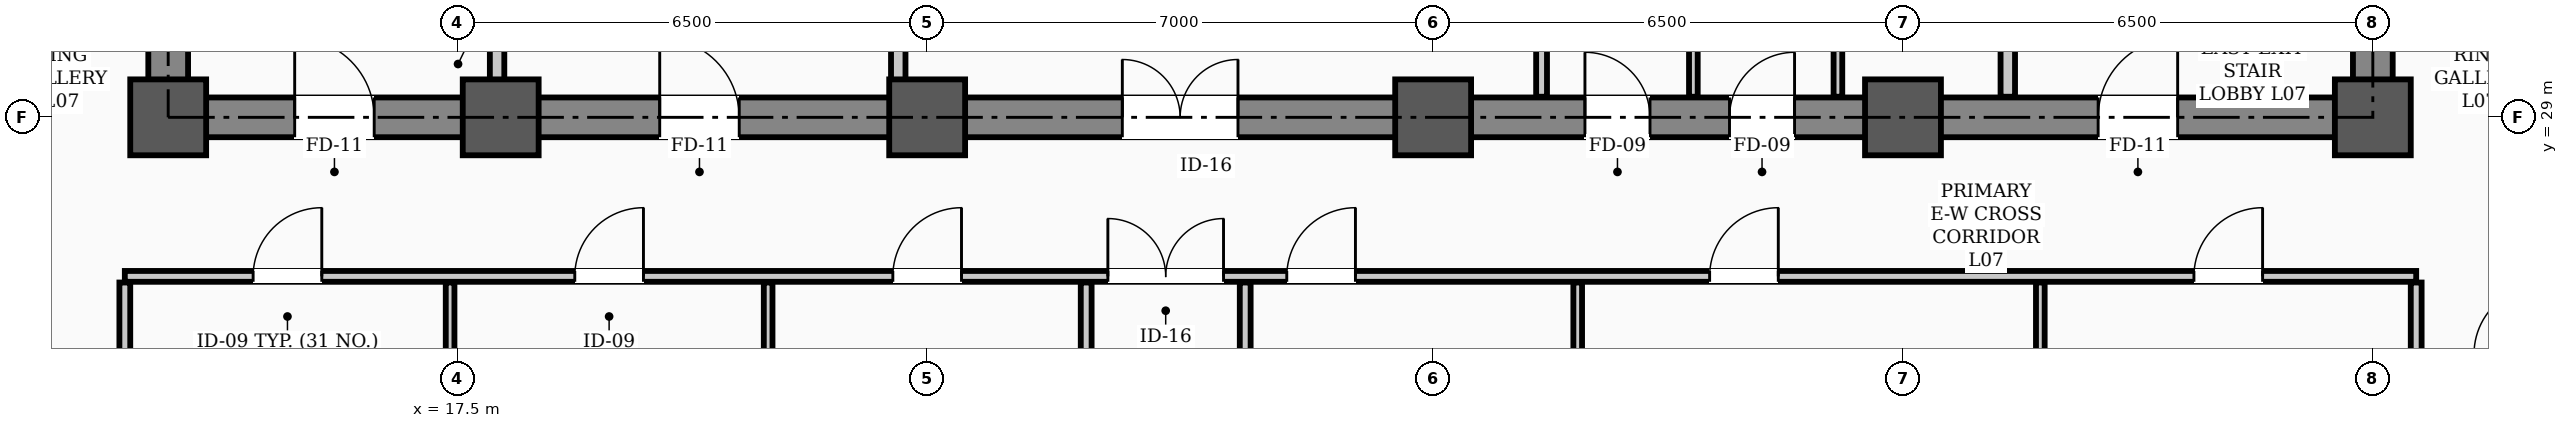
"""IFC4 building model, lengths in metres.
Left out: names, types, materials, properties, quantities, classifications, styles, units other than length and angle.
Written with IfcOpenShell. Run it as: python <this file> out.ifc"""

import sys

from ifc_helpers import new_model, si_unit, direction, frame, frame_2d, origin, origin_2d, place, context, subcontext, project, spatial, rectangle, hollow_rectangle, extrude, element, fill, save


model = new_model("IFC4")
c1 = context("Model", 3, precision=1e-05, world=origin(), true_north=direction((0.0, 1.0)))
c2 = subcontext(c1, "Body", "Model", "MODEL_VIEW")
j1 = project(units=[si_unit("LENGTHUNIT", "METRE"), si_unit("PLANEANGLEUNIT", "RADIAN")], contexts=[c1])
p1 = place(None, origin())
s1 = spatial("IfcSite", under=j1, at=p1, CompositionType="ELEMENT")
p2 = place(p1, origin())
s2 = spatial("IfcBuilding", under=s1, at=p2, CompositionType="ELEMENT")
p3 = place(p2, frame((0.0, 0.0, 30.4)))
s3 = spatial("IfcBuildingStorey", under=s2, at=p3, CompositionType="ELEMENT", Elevation=30.4)
for number, where, z_axis, x_axis in (
    (1, (13.5, 29.0, 0.0), (0.0, 0.0, 1.0), (1.0, 0.0, 0.0)),
    (2, (18.1, 29.0, 0.0), (0.0, 0.0, 1.0), (1.0, 0.0, 0.0)),
    (3, (24.0, 29.0, 0.0), (0.0, 0.0, 1.0), (1.0, 0.0, 0.0)),
    (4, (31.0, 29.0, 0.0), (0.0, 0.0, 1.0), (1.0, 0.0, 0.0)),
    (5, (37.5, 29.0, 0.0), (0.0, 0.0, 1.0), (1.0, 0.0, 0.0)),
    (6, (44.0, 29.0, 0.0), (0.0, 0.0, 1.0), (1.0, 0.0, 0.0)),
):
    element("IfcColumn", number, at=place(p3, frame(where, z_axis=z_axis, x_axis=x_axis)), inside=s3, PredefinedType="COLUMN", context=c2, shape_type="SweptSolid", body=[
        extrude(hollow_rectangle(XDim=1.05, YDim=1.05, WallThickness=0.038, InnerFilletRadius=0.019, OuterFilletRadius=0.057, at=origin_2d()), origin(), (0.0, 0.0, 1.0), 3.9),
    ])
p4 = place(p3, frame((13.5, 29.0, 0.0), z_axis=(0.0, 0.0, 1.0), x_axis=(1.0, 0.0, 0.0)))
e7 = element("IfcWall", 7, at=p4, inside=s3, PredefinedType="SHEAR", context=c2, shape_type="SweptSolid", body=[
    extrude(rectangle(XDim=30.5, YDim=0.55, at=frame_2d((15.25, 0.0))), origin(), (0.0, 0.0, 1.0), 3.72),
])
p5 = place(p4, frame((1.75, 0.0, 0.0)))
e8 = element("IfcOpeningElement", 8, at=p5, cuts=e7, PredefinedType="OPENING", context=c2, shape_type="SweptSolid", body=[
    extrude(rectangle(XDim=1.1, YDim=2.08, at=frame_2d((0.55, 1.04))), frame((0.0, 0.285, 0.0), z_axis=(0.0, -1.0, 0.0), x_axis=(1.0, 0.0, 0.0)), (0.0, 0.0, 1.0), 0.57),
])
p6 = place(p4, frame((26.7, 0.0, 0.0)))
e9 = element("IfcOpeningElement", 9, at=p6, cuts=e7, PredefinedType="OPENING", context=c2, shape_type="SweptSolid", body=[
    extrude(rectangle(XDim=1.1, YDim=2.08, at=frame_2d((0.55, 1.04))), frame((0.0, 0.285, 0.0), z_axis=(0.0, -1.0, 0.0), x_axis=(1.0, 0.0, 0.0)), (0.0, 0.0, 1.0), 0.57),
])
p7 = place(p4, frame((6.8, 0.0, 0.0)))
e10 = element("IfcOpeningElement", 10, at=p7, cuts=e7, PredefinedType="OPENING", context=c2, shape_type="SweptSolid", body=[
    extrude(rectangle(XDim=1.1, YDim=2.08, at=frame_2d((0.55, 1.04))), frame((0.0, 0.285, 0.0), z_axis=(0.0, -1.0, 0.0), x_axis=(1.0, 0.0, 0.0)), (0.0, 0.0, 1.0), 0.57),
])
p8 = place(p4, frame((13.2, 0.0, 0.0)))
e11 = element("IfcOpeningElement", 11, at=p8, cuts=e7, PredefinedType="OPENING", context=c2, shape_type="SweptSolid", body=[
    extrude(rectangle(XDim=1.6, YDim=2.08, at=frame_2d((0.8, 1.04))), frame((0.0, 0.285, 0.0), z_axis=(0.0, -1.0, 0.0), x_axis=(1.0, 0.0, 0.0)), (0.0, 0.0, 1.0), 0.57),
])
p9 = place(p4, frame((19.6, 0.0, 0.0)))
e12 = element("IfcOpeningElement", 12, at=p9, cuts=e7, PredefinedType="OPENING", context=c2, shape_type="SweptSolid", body=[
    extrude(rectangle(XDim=0.9, YDim=2.08, at=frame_2d((0.45, 1.04))), frame((0.0, 0.285, 0.0), z_axis=(0.0, -1.0, 0.0), x_axis=(1.0, 0.0, 0.0)), (0.0, 0.0, 1.0), 0.57),
])
p10 = place(p4, frame((21.6, 0.0, 0.0)))
e13 = element("IfcOpeningElement", 13, at=p10, cuts=e7, PredefinedType="OPENING", context=c2, shape_type="SweptSolid", body=[
    extrude(rectangle(XDim=0.9, YDim=2.08, at=frame_2d((0.45, 1.04))), frame((0.0, 0.285, 0.0), z_axis=(0.0, -1.0, 0.0), x_axis=(1.0, 0.0, 0.0)), (0.0, 0.0, 1.0), 0.57),
])
for number, where, z_axis, x_axis in (
    (14, (13.5, 29.35, 0.0), (0.0, 0.0, 1.0), (0.0, 1.0, 0.0)),
    (15, (44.0, 29.35, 0.0), (0.0, 0.0, 1.0), (0.0, 1.0, 0.0)),
):
    element("IfcWall", number, at=place(p3, frame(where, z_axis=z_axis, x_axis=x_axis)), inside=s3, PredefinedType="SHEAR", context=c2, shape_type="SweptSolid", body=[
        extrude(rectangle(XDim=8.6, YDim=0.55, at=frame_2d((4.3, 0.0))), origin(), (0.0, 0.0, 1.0), 3.72),
    ])
p11 = place(p3, frame((12.9, 26.8, 0.0), z_axis=(0.0, 0.0, 1.0), x_axis=(1.0, 0.0, 0.0)))
e16 = element("IfcWall", 16, at=p11, inside=s3, PredefinedType="PARTITIONING", context=c2, shape_type="SweptSolid", body=[
    extrude(rectangle(XDim=31.7, YDim=0.15, at=frame_2d((15.85, 0.0))), origin(), (0.0, 0.0, 1.0), 3.1),
])
p12 = place(p11, frame((13.6, 0.0, 0.0)))
e17 = element("IfcOpeningElement", 17, at=p12, cuts=e16, PredefinedType="OPENING", context=c2, shape_type="SweptSolid", body=[
    extrude(rectangle(XDim=1.6, YDim=2.08, at=frame_2d((0.8, 1.04))), frame((0.0, 0.085, 0.0), z_axis=(0.0, -1.0, 0.0), x_axis=(1.0, 0.0, 0.0)), (0.0, 0.0, 1.0), 0.17),
])
p13 = place(p11, frame((1.775, 0.0, 0.0)))
e18 = element("IfcOpeningElement", 18, at=p13, cuts=e16, PredefinedType="OPENING", context=c2, shape_type="SweptSolid", body=[
    extrude(rectangle(XDim=0.95, YDim=2.08, at=frame_2d((0.475, 1.04))), frame((0.0, 0.085, 0.0), z_axis=(0.0, -1.0, 0.0), x_axis=(1.0, 0.0, 0.0)), (0.0, 0.0, 1.0), 0.17),
])
p14 = place(p11, frame((6.225, 0.0, 0.0)))
e19 = element("IfcOpeningElement", 19, at=p14, cuts=e16, PredefinedType="OPENING", context=c2, shape_type="SweptSolid", body=[
    extrude(rectangle(XDim=0.95, YDim=2.08, at=frame_2d((0.475, 1.04))), frame((0.0, 0.085, 0.0), z_axis=(0.0, -1.0, 0.0), x_axis=(1.0, 0.0, 0.0)), (0.0, 0.0, 1.0), 0.17),
])
p15 = place(p11, frame((10.625, 0.0, 0.0)))
e20 = element("IfcOpeningElement", 20, at=p15, cuts=e16, PredefinedType="OPENING", context=c2, shape_type="SweptSolid", body=[
    extrude(rectangle(XDim=0.95, YDim=2.08, at=frame_2d((0.475, 1.04))), frame((0.0, 0.085, 0.0), z_axis=(0.0, -1.0, 0.0), x_axis=(1.0, 0.0, 0.0)), (0.0, 0.0, 1.0), 0.17),
])
p16 = place(p11, frame((16.075, 0.0, 0.0)))
e21 = element("IfcOpeningElement", 21, at=p16, cuts=e16, PredefinedType="OPENING", context=c2, shape_type="SweptSolid", body=[
    extrude(rectangle(XDim=0.95, YDim=2.08, at=frame_2d((0.475, 1.04))), frame((0.0, 0.085, 0.0), z_axis=(0.0, -1.0, 0.0), x_axis=(1.0, 0.0, 0.0)), (0.0, 0.0, 1.0), 0.17),
])
p17 = place(p11, frame((21.925, 0.0, 0.0)))
e22 = element("IfcOpeningElement", 22, at=p17, cuts=e16, PredefinedType="OPENING", context=c2, shape_type="SweptSolid", body=[
    extrude(rectangle(XDim=0.95, YDim=2.08, at=frame_2d((0.475, 1.04))), frame((0.0, 0.085, 0.0), z_axis=(0.0, -1.0, 0.0), x_axis=(1.0, 0.0, 0.0)), (0.0, 0.0, 1.0), 0.17),
])
p18 = place(p11, frame((28.625, 0.0, 0.0)))
e23 = element("IfcOpeningElement", 23, at=p18, cuts=e16, PredefinedType="OPENING", context=c2, shape_type="SweptSolid", body=[
    extrude(rectangle(XDim=0.95, YDim=2.08, at=frame_2d((0.475, 1.04))), frame((0.0, 0.085, 0.0), z_axis=(0.0, -1.0, 0.0), x_axis=(1.0, 0.0, 0.0)), (0.0, 0.0, 1.0), 0.17),
])
for number, where, z_axis, x_axis in (
    (24, (18.05, 29.285, 0.0), (0.0, 0.0, 1.0), (0.0, 1.0, 0.0)),
    (25, (38.95, 29.285, 0.0), (0.0, 0.0, 1.0), (0.0, 1.0, 0.0)),
):
    element("IfcWall", number, at=place(p3, frame(where, z_axis=z_axis, x_axis=x_axis)), inside=s3, PredefinedType="STANDARD", context=c2, shape_type="SweptSolid", body=[
        extrude(rectangle(XDim=1.015, YDim=0.2, at=frame_2d((0.508, 0.0))), origin(), (0.0, 0.0, 1.0), 3.3),
    ])
p19 = place(p3, frame((23.6, 29.285, 0.0), z_axis=(0.0, 0.0, 1.0), x_axis=(0.0, 1.0, 0.0)))
e26 = element("IfcWall", 26, at=p19, inside=s3, PredefinedType="STANDARD", context=c2, shape_type="SweptSolid", body=[
    extrude(rectangle(XDim=5.415, YDim=0.2, at=frame_2d((2.708, 0.0))), origin(), (0.0, 0.0, 1.0), 3.1),
])
p20 = place(p3, frame((32.5, 29.285, 0.0), z_axis=(0.0, 0.0, 1.0), x_axis=(0.0, 1.0, 0.0)))
e27 = element("IfcWall", 27, at=p20, inside=s3, PredefinedType="PARTITIONING", context=c2, shape_type="SweptSolid", body=[
    extrude(rectangle(XDim=2.48, YDim=0.15, at=frame_2d((1.24, 0.0))), origin(), (0.0, 0.0, 1.0), 3.3),
])
for number, where, z_axis, x_axis in (
    (28, (36.6, 29.285, 0.0), (0.0, 0.0, 1.0), (0.0, 1.0, 0.0)),
    (29, (34.6, 29.285, 0.0), (0.0, 0.0, 1.0), (0.0, 1.0, 0.0)),
):
    element("IfcWall", number, at=place(p3, frame(where, z_axis=z_axis, x_axis=x_axis)), inside=s3, PredefinedType="PARTITIONING", context=c2, shape_type="SweptSolid", body=[
        extrude(rectangle(XDim=2.48, YDim=0.12, at=frame_2d((1.24, 0.0))), origin(), (0.0, 0.0, 1.0), 3.3),
    ])
for number, where, z_axis, x_axis in (
    (30, (26.2, 19.335, 0.0), (0.0, 0.0, 1.0), (0.0, 1.0, 0.0)),
    (31, (28.4, 19.335, 0.0), (0.0, 0.0, 1.0), (0.0, 1.0, 0.0)),
    (32, (12.9, 19.335, 0.0), (0.0, 0.0, 1.0), (0.0, 1.0, 0.0)),
    (33, (44.6, 19.335, 0.0), (0.0, 0.0, 1.0), (0.0, 1.0, 0.0)),
):
    element("IfcWall", number, at=place(p3, frame(where, z_axis=z_axis, x_axis=x_axis)), inside=s3, PredefinedType="PARTITIONING", context=c2, shape_type="SweptSolid", body=[
        extrude(rectangle(XDim=7.38, YDim=0.15, at=frame_2d((3.69, 0.0))), origin(), (0.0, 0.0, 1.0), 3.0),
    ])
for number, where, z_axis, x_axis in (
    (34, (17.4, 19.335, 0.0), (0.0, 0.0, 1.0), (0.0, 1.0, 0.0)),
    (35, (21.8, 19.335, 0.0), (0.0, 0.0, 1.0), (0.0, 1.0, 0.0)),
    (36, (33.0, 19.335, 0.0), (0.0, 0.0, 1.0), (0.0, 1.0, 0.0)),
    (37, (39.4, 19.335, 0.0), (0.0, 0.0, 1.0), (0.0, 1.0, 0.0)),
):
    element("IfcWall", number, at=place(p3, frame(where, z_axis=z_axis, x_axis=x_axis)), inside=s3, PredefinedType="PARTITIONING", context=c2, shape_type="SweptSolid", body=[
        extrude(rectangle(XDim=7.38, YDim=0.12, at=frame_2d((3.69, 0.0))), origin(), (0.0, 0.0, 1.0), 3.0),
    ])
p21 = place(p5, origin())
e38 = element("IfcDoor", 38, at=p21, inside=s3, OperationType="SINGLE_SWING_LEFT", PredefinedType="DOOR", context=c2, shape_type="SweptSolid", body=[
    extrude(rectangle(XDim=1.1, YDim=2.08, at=frame_2d((0.55, 1.04))), frame((0.0, 0.025, 0.0), z_axis=(0.0, -1.0, 0.0), x_axis=(1.0, 0.0, 0.0)), (0.0, 0.0, 1.0), 0.05),
])
fill(e8, e38)
p22 = place(p6, origin())
e39 = element("IfcDoor", 39, at=p22, inside=s3, OperationType="SINGLE_SWING_RIGHT", PredefinedType="DOOR", context=c2, shape_type="SweptSolid", body=[
    extrude(rectangle(XDim=1.1, YDim=2.08, at=frame_2d((0.55, 1.04))), frame((0.0, 0.025, 0.0), z_axis=(0.0, -1.0, 0.0), x_axis=(1.0, 0.0, 0.0)), (0.0, 0.0, 1.0), 0.05),
])
fill(e9, e39)
p23 = place(p7, origin())
e40 = element("IfcDoor", 40, at=p23, inside=s3, OperationType="SINGLE_SWING_LEFT", PredefinedType="DOOR", context=c2, shape_type="SweptSolid", body=[
    extrude(rectangle(XDim=1.1, YDim=2.08, at=frame_2d((0.55, 1.04))), frame((0.0, 0.025, 0.0), z_axis=(0.0, -1.0, 0.0), x_axis=(1.0, 0.0, 0.0)), (0.0, 0.0, 1.0), 0.05),
])
fill(e10, e40)
p24 = place(p8, origin())
e41 = element("IfcDoor", 41, at=p24, inside=s3, OperationType="DOUBLE_DOOR_SINGLE_SWING", PredefinedType="DOOR", context=c2, shape_type="SweptSolid", body=[
    extrude(rectangle(XDim=1.6, YDim=2.08, at=frame_2d((0.8, 1.04))), frame((0.0, 0.025, 0.0), z_axis=(0.0, -1.0, 0.0), x_axis=(1.0, 0.0, 0.0)), (0.0, 0.0, 1.0), 0.05),
])
fill(e11, e41)
p25 = place(p9, origin())
e42 = element("IfcDoor", 42, at=p25, inside=s3, OperationType="SINGLE_SWING_LEFT", PredefinedType="DOOR", context=c2, shape_type="SweptSolid", body=[
    extrude(rectangle(XDim=0.9, YDim=2.08, at=frame_2d((0.45, 1.04))), frame((0.0, 0.025, 0.0), z_axis=(0.0, -1.0, 0.0), x_axis=(1.0, 0.0, 0.0)), (0.0, 0.0, 1.0), 0.05),
])
fill(e12, e42)
p26 = place(p10, origin())
e43 = element("IfcDoor", 43, at=p26, inside=s3, OperationType="SINGLE_SWING_RIGHT", PredefinedType="DOOR", context=c2, shape_type="SweptSolid", body=[
    extrude(rectangle(XDim=0.9, YDim=2.08, at=frame_2d((0.45, 1.04))), frame((0.0, 0.025, 0.0), z_axis=(0.0, -1.0, 0.0), x_axis=(1.0, 0.0, 0.0)), (0.0, 0.0, 1.0), 0.05),
])
fill(e13, e43)
p27 = place(p12, origin())
e44 = element("IfcDoor", 44, at=p27, inside=s3, OperationType="DOUBLE_DOOR_SINGLE_SWING", PredefinedType="DOOR", context=c2, shape_type="SweptSolid", body=[
    extrude(rectangle(XDim=1.6, YDim=2.08, at=frame_2d((0.8, 1.04))), frame((0.0, 0.025, 0.0), z_axis=(0.0, -1.0, 0.0), x_axis=(1.0, 0.0, 0.0)), (0.0, 0.0, 1.0), 0.05),
])
fill(e17, e44)
p28 = place(p13, origin())
e45 = element("IfcDoor", 45, at=p28, inside=s3, OperationType="SINGLE_SWING_RIGHT", PredefinedType="DOOR", context=c2, shape_type="SweptSolid", body=[
    extrude(rectangle(XDim=0.95, YDim=2.08, at=frame_2d((0.475, 1.04))), frame((0.0, 0.025, 0.0), z_axis=(0.0, -1.0, 0.0), x_axis=(1.0, 0.0, 0.0)), (0.0, 0.0, 1.0), 0.05),
])
fill(e18, e45)
p29 = place(p14, origin())
e46 = element("IfcDoor", 46, at=p29, inside=s3, OperationType="SINGLE_SWING_RIGHT", PredefinedType="DOOR", context=c2, shape_type="SweptSolid", body=[
    extrude(rectangle(XDim=0.95, YDim=2.08, at=frame_2d((0.475, 1.04))), frame((0.0, 0.025, 0.0), z_axis=(0.0, -1.0, 0.0), x_axis=(1.0, 0.0, 0.0)), (0.0, 0.0, 1.0), 0.05),
])
fill(e19, e46)
p30 = place(p15, origin())
e47 = element("IfcDoor", 47, at=p30, inside=s3, OperationType="SINGLE_SWING_RIGHT", PredefinedType="DOOR", context=c2, shape_type="SweptSolid", body=[
    extrude(rectangle(XDim=0.95, YDim=2.08, at=frame_2d((0.475, 1.04))), frame((0.0, 0.025, 0.0), z_axis=(0.0, -1.0, 0.0), x_axis=(1.0, 0.0, 0.0)), (0.0, 0.0, 1.0), 0.05),
])
fill(e20, e47)
p31 = place(p16, origin())
e48 = element("IfcDoor", 48, at=p31, inside=s3, OperationType="SINGLE_SWING_RIGHT", PredefinedType="DOOR", context=c2, shape_type="SweptSolid", body=[
    extrude(rectangle(XDim=0.95, YDim=2.08, at=frame_2d((0.475, 1.04))), frame((0.0, 0.025, 0.0), z_axis=(0.0, -1.0, 0.0), x_axis=(1.0, 0.0, 0.0)), (0.0, 0.0, 1.0), 0.05),
])
fill(e21, e48)
p32 = place(p17, origin())
e49 = element("IfcDoor", 49, at=p32, inside=s3, OperationType="SINGLE_SWING_RIGHT", PredefinedType="DOOR", context=c2, shape_type="SweptSolid", body=[
    extrude(rectangle(XDim=0.95, YDim=2.08, at=frame_2d((0.475, 1.04))), frame((0.0, 0.025, 0.0), z_axis=(0.0, -1.0, 0.0), x_axis=(1.0, 0.0, 0.0)), (0.0, 0.0, 1.0), 0.05),
])
fill(e22, e49)
p33 = place(p18, origin())
e50 = element("IfcDoor", 50, at=p33, inside=s3, OperationType="SINGLE_SWING_RIGHT", PredefinedType="DOOR", context=c2, shape_type="SweptSolid", body=[
    extrude(rectangle(XDim=0.95, YDim=2.08, at=frame_2d((0.475, 1.04))), frame((0.0, 0.025, 0.0), z_axis=(0.0, -1.0, 0.0), x_axis=(1.0, 0.0, 0.0)), (0.0, 0.0, 1.0), 0.05),
])
fill(e23, e50)
save(model, sys.argv[1])
